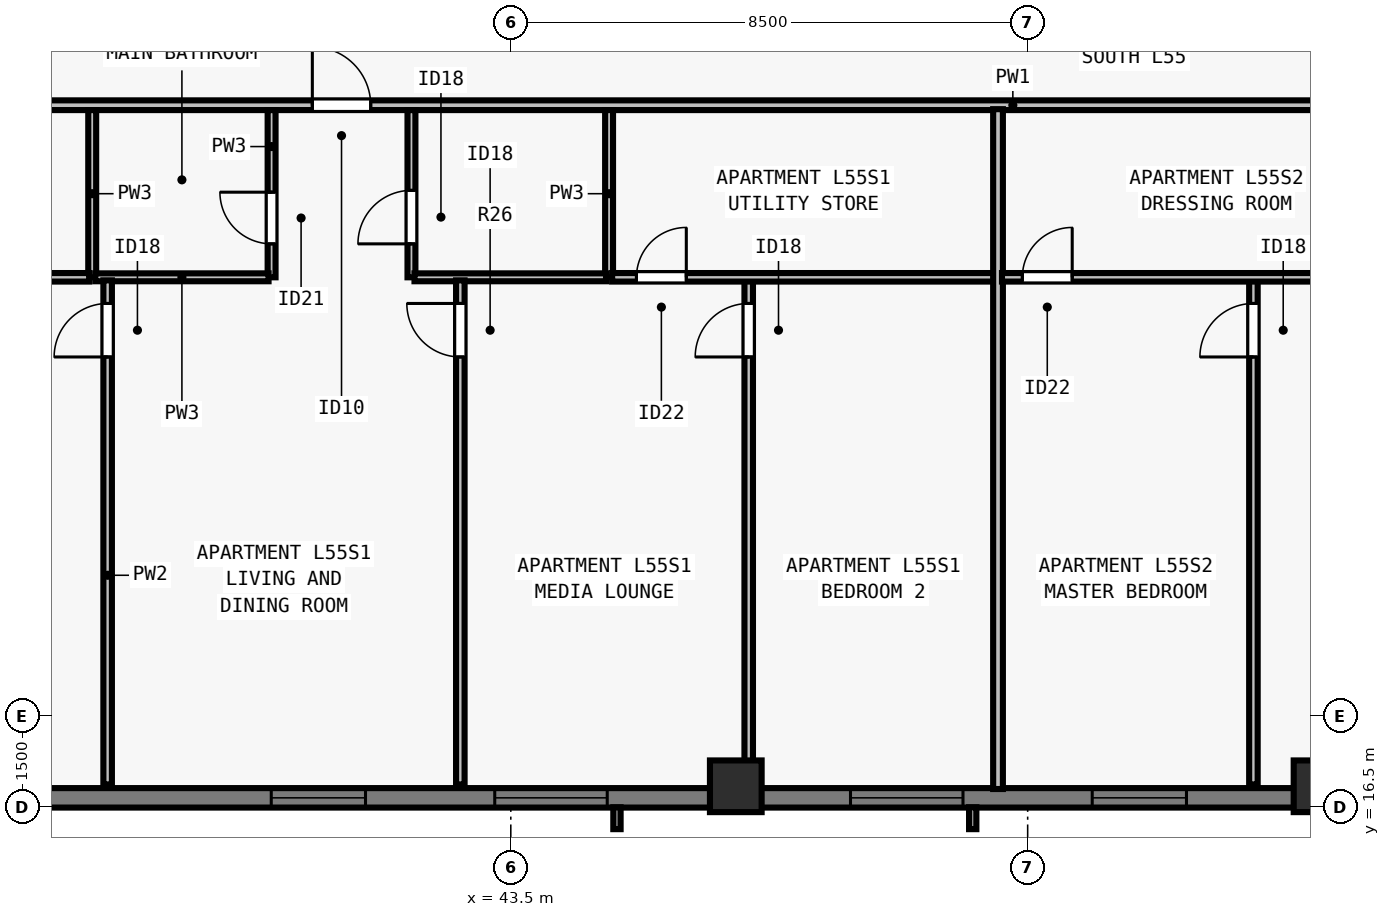
"""IFC4 building model, lengths in metres.
Left out: names, types, materials, properties, quantities, classifications, styles, units other than length and angle.
Written with IfcOpenShell. Run it as: python <this file> out.ifc"""

import sys

from ifc_helpers import new_model, si_unit, direction, frame, frame_2d, origin, origin_2d, place, context, subcontext, project, spatial, rectangle, extrude, element, fill, save


model = new_model("IFC4")
c1 = context("Model", 3, precision=1e-05, world=origin(), true_north=direction((0.0, 1.0)))
c2 = subcontext(c1, "Body", "Model", "MODEL_VIEW")
j1 = project(units=[si_unit("LENGTHUNIT", "METRE"), si_unit("PLANEANGLEUNIT", "RADIAN")], contexts=[c1])
p1 = place(None, origin())
s1 = spatial("IfcSite", under=j1, at=p1, CompositionType="ELEMENT")
p2 = place(p1, origin())
s2 = spatial("IfcBuilding", under=s1, at=p2, CompositionType="ELEMENT")
p3 = place(p2, frame((0.0, 0.0, 202.5)))
s3 = spatial("IfcBuildingStorey", under=s2, at=p3, CompositionType="ELEMENT", Elevation=202.5)
for number, where, z_axis, x_axis in (
    (1, (47.2, 16.85, 0.0), (0.0, 0.0, 1.0), (1.0, 0.0, 0.0)),
    (2, (56.8, 16.85, 0.0), (0.0, 0.0, 1.0), (1.0, 0.0, 0.0)),
):
    element("IfcColumn", number, at=place(p3, frame(where, z_axis=z_axis, x_axis=x_axis)), inside=s3, PredefinedType="COLUMN", context=c2, shape_type="SweptSolid", body=[
        extrude(rectangle(XDim=0.85, YDim=0.85, at=origin_2d()), origin(), (0.0, 0.0, 1.0), 3.5),
    ])
p4 = place(p3, frame((69.5, 16.66, 0.0), z_axis=(0.0, 0.0, 1.0), x_axis=(-1.0, 0.0, 0.0)))
e3 = element("IfcWall", 3, at=p4, inside=s3, PredefinedType="SOLIDWALL", context=c2, shape_type="SweptSolid", body=[
    extrude(rectangle(XDim=34.702, YDim=0.32, at=frame_2d((17.351, 0.0))), origin(), (0.0, 0.0, 1.0), 3.29),
])
p5 = place(p4, frame((5.863, 0.0, 0.8)))
e4 = element("IfcOpeningElement", 4, at=p5, cuts=e3, PredefinedType="OPENING", context=c2, shape_type="SweptSolid", body=[
    extrude(rectangle(XDim=1.85, YDim=1.678, at=frame_2d((0.925, 0.839))), frame((0.0, 0.17, 0.0), z_axis=(0.0, -1.0, 0.0), x_axis=(1.0, 0.0, 0.0)), (0.0, 0.0, 1.0), 0.34),
])
p6 = place(p4, frame((8.138, 0.0, 0.8)))
e5 = element("IfcOpeningElement", 5, at=p6, cuts=e3, PredefinedType="OPENING", context=c2, shape_type="SweptSolid", body=[
    extrude(rectangle(XDim=1.55, YDim=1.678, at=frame_2d((0.775, 0.839))), frame((0.0, 0.17, 0.0), z_axis=(0.0, -1.0, 0.0), x_axis=(1.0, 0.0, 0.0)), (0.0, 0.0, 1.0), 0.34),
])
p7 = place(p4, frame((10.113, 0.0, 0.8)))
e6 = element("IfcOpeningElement", 6, at=p7, cuts=e3, PredefinedType="OPENING", context=c2, shape_type="SweptSolid", body=[
    extrude(rectangle(XDim=1.85, YDim=1.678, at=frame_2d((0.925, 0.839))), frame((0.0, 0.17, 0.0), z_axis=(0.0, -1.0, 0.0), x_axis=(1.0, 0.0, 0.0)), (0.0, 0.0, 1.0), 0.34),
])
p8 = place(p4, frame((14.888, 0.0, 0.8)))
e7 = element("IfcOpeningElement", 7, at=p8, cuts=e3, PredefinedType="OPENING", context=c2, shape_type="SweptSolid", body=[
    extrude(rectangle(XDim=1.55, YDim=1.678, at=frame_2d((0.775, 0.839))), frame((0.0, 0.17, 0.0), z_axis=(0.0, -1.0, 0.0), x_axis=(1.0, 0.0, 0.0)), (0.0, 0.0, 1.0), 0.34),
])
p9 = place(p4, frame((18.564, 0.0, 0.8)))
e8 = element("IfcOpeningElement", 8, at=p9, cuts=e3, PredefinedType="OPENING", context=c2, shape_type="SweptSolid", body=[
    extrude(rectangle(XDim=1.85, YDim=1.678, at=frame_2d((0.925, 0.839))), frame((0.0, 0.17, 0.0), z_axis=(0.0, -1.0, 0.0), x_axis=(1.0, 0.0, 0.0)), (0.0, 0.0, 1.0), 0.34),
])
p10 = place(p4, frame((24.414, 0.0, 0.8)))
e9 = element("IfcOpeningElement", 9, at=p10, cuts=e3, PredefinedType="OPENING", context=c2, shape_type="SweptSolid", body=[
    extrude(rectangle(XDim=1.85, YDim=1.678, at=frame_2d((0.925, 0.839))), frame((0.0, 0.17, 0.0), z_axis=(0.0, -1.0, 0.0), x_axis=(1.0, 0.0, 0.0)), (0.0, 0.0, 1.0), 0.34),
])
p11 = place(p4, frame((28.389, 0.0, 0.8)))
e10 = element("IfcOpeningElement", 10, at=p11, cuts=e3, PredefinedType="OPENING", context=c2, shape_type="SweptSolid", body=[
    extrude(rectangle(XDim=1.55, YDim=1.678, at=frame_2d((0.775, 0.839))), frame((0.0, 0.17, 0.0), z_axis=(0.0, -1.0, 0.0), x_axis=(1.0, 0.0, 0.0)), (0.0, 0.0, 1.0), 0.34),
])
p12 = place(p3, frame((29.805, 28.05, 0.0), z_axis=(0.0, 0.0, 1.0), x_axis=(1.0, 0.0, 0.0)))
e11 = element("IfcWall", 11, at=p12, inside=s3, PredefinedType="PARTITIONING", context=c2, shape_type="SweptSolid", body=[
    extrude(rectangle(XDim=44.39, YDim=0.16, at=frame_2d((22.195, 0.0))), origin(), (0.0, 0.0, 1.0), 2.958),
])
p13 = place(p12, frame((10.431, 0.0, 0.0)))
e12 = element("IfcOpeningElement", 12, at=p13, cuts=e11, PredefinedType="OPENING", context=c2, shape_type="SweptSolid", body=[
    extrude(rectangle(XDim=0.96, YDim=2.18, at=frame_2d((0.48, 1.09))), frame((0.0, 0.09, 0.0), z_axis=(0.0, -1.0, 0.0), x_axis=(1.0, 0.0, 0.0)), (0.0, 0.0, 1.0), 0.18),
])
p14 = place(p12, frame((32.511, 0.0, 0.0)))
e13 = element("IfcOpeningElement", 13, at=p14, cuts=e11, PredefinedType="OPENING", context=c2, shape_type="SweptSolid", body=[
    extrude(rectangle(XDim=0.96, YDim=2.18, at=frame_2d((0.48, 1.09))), frame((0.0, 0.09, 0.0), z_axis=(0.0, -1.0, 0.0), x_axis=(1.0, 0.0, 0.0)), (0.0, 0.0, 1.0), 0.18),
])
p15 = place(p3, frame((36.616, 25.22, 0.0), z_axis=(0.0, 0.0, 1.0), x_axis=(0.0, 1.0, 0.0)))
e14 = element("IfcWall", 14, at=p15, inside=s3, PredefinedType="PLUMBINGWALL", context=c2, shape_type="SweptSolid", body=[
    extrude(rectangle(XDim=2.75, YDim=0.13, at=frame_2d((1.375, 0.0))), origin(), (0.0, 0.0, 1.0), 3.29),
])
p16 = place(p3, frame((39.566, 25.22, 0.0), z_axis=(0.0, 0.0, 1.0), x_axis=(0.0, 1.0, 0.0)))
e15 = element("IfcWall", 15, at=p16, inside=s3, PredefinedType="PLUMBINGWALL", context=c2, shape_type="SweptSolid", body=[
    extrude(rectangle(XDim=2.75, YDim=0.13, at=frame_2d((1.375, 0.0))), origin(), (0.0, 0.0, 1.0), 3.29),
])
p17 = place(p16, frame((0.55, 0.0, 0.0)))
e16 = element("IfcOpeningElement", 16, at=p17, cuts=e15, PredefinedType="OPENING", context=c2, shape_type="SweptSolid", body=[
    extrude(rectangle(XDim=0.85, YDim=2.08, at=frame_2d((0.425, 1.04))), frame((0.0, 0.075, 0.0), z_axis=(0.0, -1.0, 0.0), x_axis=(1.0, 0.0, 0.0)), (0.0, 0.0, 1.0), 0.15),
])
p18 = place(p3, frame((36.666, 25.22, 0.0), z_axis=(0.0, 0.0, 1.0), x_axis=(1.0, 0.0, 0.0)))
e17 = element("IfcWall", 17, at=p18, inside=s3, PredefinedType="PLUMBINGWALL", context=c2, shape_type="SweptSolid", body=[
    extrude(rectangle(XDim=2.85, YDim=0.13, at=frame_2d((1.425, 0.0))), origin(), (0.0, 0.0, 1.0), 3.29),
])
p19 = place(p3, frame((45.116, 25.22, 0.0), z_axis=(0.0, 0.0, 1.0), x_axis=(0.0, 1.0, 0.0)))
e18 = element("IfcWall", 18, at=p19, inside=s3, PredefinedType="PLUMBINGWALL", context=c2, shape_type="SweptSolid", body=[
    extrude(rectangle(XDim=2.75, YDim=0.13, at=frame_2d((1.375, 0.0))), origin(), (0.0, 0.0, 1.0), 3.29),
])
p20 = place(p3, frame((41.866, 25.22, 0.0), z_axis=(0.0, 0.0, 1.0), x_axis=(0.0, 1.0, 0.0)))
e19 = element("IfcWall", 19, at=p20, inside=s3, PredefinedType="PLUMBINGWALL", context=c2, shape_type="SweptSolid", body=[
    extrude(rectangle(XDim=2.75, YDim=0.13, at=frame_2d((1.375, 0.0))), origin(), (0.0, 0.0, 1.0), 2.573),
])
p21 = place(p20, frame((0.55, 0.0, 0.0)))
e20 = element("IfcOpeningElement", 20, at=p21, cuts=e19, PredefinedType="OPENING", context=c2, shape_type="SweptSolid", body=[
    extrude(rectangle(XDim=0.88, YDim=2.1, at=frame_2d((0.44, 1.05))), frame((0.0, 0.075, 0.0), z_axis=(0.0, -1.0, 0.0), x_axis=(1.0, 0.0, 0.0)), (0.0, 0.0, 1.0), 0.15),
])
p22 = place(p3, frame((41.916, 25.22, 0.0), z_axis=(0.0, 0.0, 1.0), x_axis=(1.0, 0.0, 0.0)))
e21 = element("IfcWall", 21, at=p22, inside=s3, PredefinedType="PLUMBINGWALL", context=c2, shape_type="SweptSolid", body=[
    extrude(rectangle(XDim=3.15, YDim=0.13, at=frame_2d((1.575, 0.0))), origin(), (0.0, 0.0, 1.0), 3.29),
])
p23 = place(p3, frame((36.87, 16.88, 0.0), z_axis=(0.0, 0.0, 1.0), x_axis=(0.0, 1.0, 0.0)))
e22 = element("IfcWall", 22, at=p23, inside=s3, PredefinedType="PARTITIONING", context=c2, shape_type="SweptSolid", body=[
    extrude(rectangle(XDim=8.29, YDim=0.14, at=frame_2d((4.145, 0.0))), origin(), (0.0, 0.0, 1.0), 2.573),
])
p24 = place(p23, frame((7.03, 0.0, 0.0)))
e23 = element("IfcOpeningElement", 23, at=p24, cuts=e22, PredefinedType="OPENING", context=c2, shape_type="SweptSolid", body=[
    extrude(rectangle(XDim=0.88, YDim=2.1, at=frame_2d((0.44, 1.05))), frame((0.0, 0.08, 0.0), z_axis=(0.0, -1.0, 0.0), x_axis=(1.0, 0.0, 0.0)), (0.0, 0.0, 1.0), 0.16),
])
p25 = place(p3, frame((29.87, 25.22, 0.0), z_axis=(0.0, 0.0, 1.0), x_axis=(1.0, 0.0, 0.0)))
e24 = element("IfcWall", 24, at=p25, inside=s3, PredefinedType="PARTITIONING", context=c2, shape_type="SweptSolid", body=[
    extrude(rectangle(XDim=6.696, YDim=0.14, at=frame_2d((3.348, 0.0))), origin(), (0.0, 0.0, 1.0), 2.958),
])
p26 = place(p25, frame((0.45, 0.0, 0.0)))
e25 = element("IfcOpeningElement", 25, at=p26, cuts=e24, PredefinedType="OPENING", context=c2, shape_type="SweptSolid", body=[
    extrude(rectangle(XDim=0.82, YDim=2.1, at=frame_2d((0.41, 1.05))), frame((0.0, 0.08, 0.0), z_axis=(0.0, -1.0, 0.0), x_axis=(1.0, 0.0, 0.0)), (0.0, 0.0, 1.0), 0.16),
])
p27 = place(p3, frame((47.413, 16.88, 0.0), z_axis=(0.0, 0.0, 1.0), x_axis=(0.0, 1.0, 0.0)))
e26 = element("IfcWall", 26, at=p27, inside=s3, PredefinedType="PARTITIONING", context=c2, shape_type="SweptSolid", body=[
    extrude(rectangle(XDim=8.38, YDim=0.14, at=frame_2d((4.19, 0.0))), origin(), (0.0, 0.0, 1.0), 2.573),
])
p28 = place(p27, frame((7.03, 0.0, 0.0)))
e27 = element("IfcOpeningElement", 27, at=p28, cuts=e26, PredefinedType="OPENING", context=c2, shape_type="SweptSolid", body=[
    extrude(rectangle(XDim=0.88, YDim=2.1, at=frame_2d((0.44, 1.05))), frame((0.0, 0.08, 0.0), z_axis=(0.0, -1.0, 0.0), x_axis=(1.0, 0.0, 0.0)), (0.0, 0.0, 1.0), 0.16),
])
p29 = place(p3, frame((45.166, 25.22, 0.0), z_axis=(0.0, 0.0, 1.0), x_axis=(1.0, 0.0, 0.0)))
e28 = element("IfcWall", 28, at=p29, inside=s3, PredefinedType="PARTITIONING", context=c2, shape_type="SweptSolid", body=[
    extrude(rectangle(XDim=6.396, YDim=0.14, at=frame_2d((3.198, 0.0))), origin(), (0.0, 0.0, 1.0), 3.29),
])
p30 = place(p29, frame((0.4, 0.0, 0.0)))
e29 = element("IfcOpeningElement", 29, at=p30, cuts=e28, PredefinedType="OPENING", context=c2, shape_type="SweptSolid", body=[
    extrude(rectangle(XDim=0.82, YDim=2.1, at=frame_2d((0.41, 1.05))), frame((0.0, 0.08, 0.0), z_axis=(0.0, -1.0, 0.0), x_axis=(1.0, 0.0, 0.0)), (0.0, 0.0, 1.0), 0.16),
])
p31 = place(p3, frame((42.67, 16.88, 0.0), z_axis=(0.0, 0.0, 1.0), x_axis=(0.0, 1.0, 0.0)))
e30 = element("IfcWall", 30, at=p31, inside=s3, PredefinedType="PARTITIONING", context=c2, shape_type="SweptSolid", body=[
    extrude(rectangle(XDim=8.29, YDim=0.14, at=frame_2d((4.145, 0.0))), origin(), (0.0, 0.0, 1.0), 3.29),
])
p32 = place(p31, frame((7.03, 0.0, 0.0)))
e31 = element("IfcOpeningElement", 31, at=p32, cuts=e30, PredefinedType="OPENING", context=c2, shape_type="SweptSolid", body=[
    extrude(rectangle(XDim=0.88, YDim=2.1, at=frame_2d((0.44, 1.05))), frame((0.0, 0.08, 0.0), z_axis=(0.0, -1.0, 0.0), x_axis=(1.0, 0.0, 0.0)), (0.0, 0.0, 1.0), 0.16),
])
p33 = place(p3, frame((51.512, 16.805, 0.0), z_axis=(0.0, 0.0, 1.0), x_axis=(0.0, 1.0, 0.0)))
e32 = element("IfcWall", 32, at=p33, inside=s3, PredefinedType="PARTITIONING", context=c2, shape_type="SweptSolid", body=[
    extrude(rectangle(XDim=11.18, YDim=0.16, at=frame_2d((5.59, 0.0))), origin(), (0.0, 0.0, 1.0), 2.958),
])
p34 = place(p3, frame((55.712, 16.88, 0.0), z_axis=(0.0, 0.0, 1.0), x_axis=(0.0, 1.0, 0.0)))
e33 = element("IfcWall", 33, at=p34, inside=s3, PredefinedType="PARTITIONING", context=c2, shape_type="SweptSolid", body=[
    extrude(rectangle(XDim=8.38, YDim=0.14, at=frame_2d((4.19, 0.0))), origin(), (0.0, 0.0, 1.0), 3.29),
])
p35 = place(p34, frame((7.03, 0.0, 0.0)))
e34 = element("IfcOpeningElement", 34, at=p35, cuts=e33, PredefinedType="OPENING", context=c2, shape_type="SweptSolid", body=[
    extrude(rectangle(XDim=0.88, YDim=2.1, at=frame_2d((0.44, 1.05))), frame((0.0, 0.08, 0.0), z_axis=(0.0, -1.0, 0.0), x_axis=(1.0, 0.0, 0.0)), (0.0, 0.0, 1.0), 0.16),
])
p36 = place(p3, frame((51.577, 25.22, 0.0), z_axis=(0.0, 0.0, 1.0), x_axis=(1.0, 0.0, 0.0)))
e35 = element("IfcWall", 35, at=p36, inside=s3, PredefinedType="PARTITIONING", context=c2, shape_type="SweptSolid", body=[
    extrude(rectangle(XDim=7.069, YDim=0.14, at=frame_2d((3.534, 0.0))), origin(), (0.0, 0.0, 1.0), 3.29),
])
p37 = place(p36, frame((0.335, 0.0, 0.0)))
e36 = element("IfcOpeningElement", 36, at=p37, cuts=e35, PredefinedType="OPENING", context=c2, shape_type="SweptSolid", body=[
    extrude(rectangle(XDim=0.82, YDim=2.1, at=frame_2d((0.41, 1.05))), frame((0.0, 0.08, 0.0), z_axis=(0.0, -1.0, 0.0), x_axis=(1.0, 0.0, 0.0)), (0.0, 0.0, 1.0), 0.16),
])
p38 = place(p8, origin())
e37 = element("IfcWindow", 37, at=p38, inside=s3, PartitioningType="SINGLE_PANEL", PredefinedType="WINDOW", context=c2, shape_type="SweptSolid", body=[
    extrude(rectangle(XDim=1.55, YDim=1.678, at=frame_2d((0.775, 0.839))), frame((0.0, -0.05, 0.0), z_axis=(0.0, -1.0, 0.0), x_axis=(1.0, 0.0, 0.0)), (0.0, 0.0, 1.0), 0.06),
])
fill(e7, e37)
p39 = place(p9, origin())
e38 = element("IfcWindow", 38, at=p39, inside=s3, PartitioningType="SINGLE_PANEL", PredefinedType="WINDOW", context=c2, shape_type="SweptSolid", body=[
    extrude(rectangle(XDim=1.85, YDim=1.678, at=frame_2d((0.925, 0.839))), frame((0.0, -0.05, 0.0), z_axis=(0.0, -1.0, 0.0), x_axis=(1.0, 0.0, 0.0)), (0.0, 0.0, 1.0), 0.06),
])
fill(e8, e38)
p40 = place(p10, origin())
e39 = element("IfcWindow", 39, at=p40, inside=s3, PartitioningType="SINGLE_PANEL", PredefinedType="WINDOW", context=c2, shape_type="SweptSolid", body=[
    extrude(rectangle(XDim=1.85, YDim=1.678, at=frame_2d((0.925, 0.839))), frame((0.0, -0.05, 0.0), z_axis=(0.0, -1.0, 0.0), x_axis=(1.0, 0.0, 0.0)), (0.0, 0.0, 1.0), 0.06),
])
fill(e9, e39)
p41 = place(p11, origin())
e40 = element("IfcWindow", 40, at=p41, inside=s3, PartitioningType="SINGLE_PANEL", PredefinedType="WINDOW", context=c2, shape_type="SweptSolid", body=[
    extrude(rectangle(XDim=1.55, YDim=1.678, at=frame_2d((0.775, 0.839))), frame((0.0, -0.05, 0.0), z_axis=(0.0, -1.0, 0.0), x_axis=(1.0, 0.0, 0.0)), (0.0, 0.0, 1.0), 0.06),
])
fill(e10, e40)
p42 = place(p17, origin())
e41 = element("IfcDoor", 41, at=p42, inside=s3, OperationType="SINGLE_SWING_RIGHT", PredefinedType="DOOR", context=c2, shape_type="SweptSolid", body=[
    extrude(rectangle(XDim=0.85, YDim=2.08, at=frame_2d((0.425, 1.04))), frame((0.0, 0.025, 0.0), z_axis=(0.0, -1.0, 0.0), x_axis=(1.0, 0.0, 0.0)), (0.0, 0.0, 1.0), 0.05),
])
fill(e16, e41)
p43 = place(p21, origin())
e42 = element("IfcDoor", 42, at=p43, inside=s3, OperationType="SINGLE_SWING_LEFT", PredefinedType="DOOR", context=c2, shape_type="SweptSolid", body=[
    extrude(rectangle(XDim=0.88, YDim=2.1, at=frame_2d((0.44, 1.05))), frame((0.0, 0.025, 0.0), z_axis=(0.0, -1.0, 0.0), x_axis=(1.0, 0.0, 0.0)), (0.0, 0.0, 1.0), 0.05),
])
fill(e20, e42)
p44 = place(p24, origin())
e43 = element("IfcDoor", 43, at=p44, inside=s3, OperationType="SINGLE_SWING_LEFT", PredefinedType="DOOR", context=c2, shape_type="SweptSolid", body=[
    extrude(rectangle(XDim=0.88, YDim=2.1, at=frame_2d((0.44, 1.05))), frame((0.0, 0.025, 0.0), z_axis=(0.0, -1.0, 0.0), x_axis=(1.0, 0.0, 0.0)), (0.0, 0.0, 1.0), 0.05),
])
fill(e23, e43)
p45 = place(p30, origin())
e44 = element("IfcDoor", 44, at=p45, inside=s3, OperationType="SINGLE_SWING_RIGHT", PredefinedType="DOOR", context=c2, shape_type="SweptSolid", body=[
    extrude(rectangle(XDim=0.82, YDim=2.1, at=frame_2d((0.41, 1.05))), frame((0.0, 0.025, 0.0), z_axis=(0.0, -1.0, 0.0), x_axis=(1.0, 0.0, 0.0)), (0.0, 0.0, 1.0), 0.05),
])
fill(e29, e44)
p46 = place(p28, origin())
e45 = element("IfcDoor", 45, at=p46, inside=s3, OperationType="SINGLE_SWING_LEFT", PredefinedType="DOOR", context=c2, shape_type="SweptSolid", body=[
    extrude(rectangle(XDim=0.88, YDim=2.1, at=frame_2d((0.44, 1.05))), frame((0.0, 0.025, 0.0), z_axis=(0.0, -1.0, 0.0), x_axis=(1.0, 0.0, 0.0)), (0.0, 0.0, 1.0), 0.05),
])
fill(e27, e45)
p47 = place(p32, origin())
e46 = element("IfcDoor", 46, at=p47, inside=s3, OperationType="SINGLE_SWING_RIGHT", PredefinedType="DOOR", context=c2, shape_type="SweptSolid", body=[
    extrude(rectangle(XDim=0.88, YDim=2.1, at=frame_2d((0.44, 1.05))), frame((0.0, 0.025, 0.0), z_axis=(0.0, -1.0, 0.0), x_axis=(1.0, 0.0, 0.0)), (0.0, 0.0, 1.0), 0.05),
])
fill(e31, e46)
p48 = place(p13, origin())
e47 = element("IfcDoor", 47, at=p48, inside=s3, OperationType="SINGLE_SWING_LEFT", PredefinedType="DOOR", context=c2, shape_type="SweptSolid", body=[
    extrude(rectangle(XDim=0.96, YDim=2.18, at=frame_2d((0.48, 1.09))), frame((0.0, 0.025, 0.0), z_axis=(0.0, -1.0, 0.0), x_axis=(1.0, 0.0, 0.0)), (0.0, 0.0, 1.0), 0.05),
])
fill(e12, e47)
p49 = place(p37, origin())
e48 = element("IfcDoor", 48, at=p49, inside=s3, OperationType="SINGLE_SWING_RIGHT", PredefinedType="DOOR", context=c2, shape_type="SweptSolid", body=[
    extrude(rectangle(XDim=0.82, YDim=2.1, at=frame_2d((0.41, 1.05))), frame((0.0, 0.025, 0.0), z_axis=(0.0, -1.0, 0.0), x_axis=(1.0, 0.0, 0.0)), (0.0, 0.0, 1.0), 0.05),
])
fill(e36, e48)
p50 = place(p35, origin())
e49 = element("IfcDoor", 49, at=p50, inside=s3, OperationType="SINGLE_SWING_LEFT", PredefinedType="DOOR", context=c2, shape_type="SweptSolid", body=[
    extrude(rectangle(XDim=0.88, YDim=2.1, at=frame_2d((0.44, 1.05))), frame((0.0, 0.025, 0.0), z_axis=(0.0, -1.0, 0.0), x_axis=(1.0, 0.0, 0.0)), (0.0, 0.0, 1.0), 0.05),
])
fill(e34, e49)
save(model, sys.argv[1])
